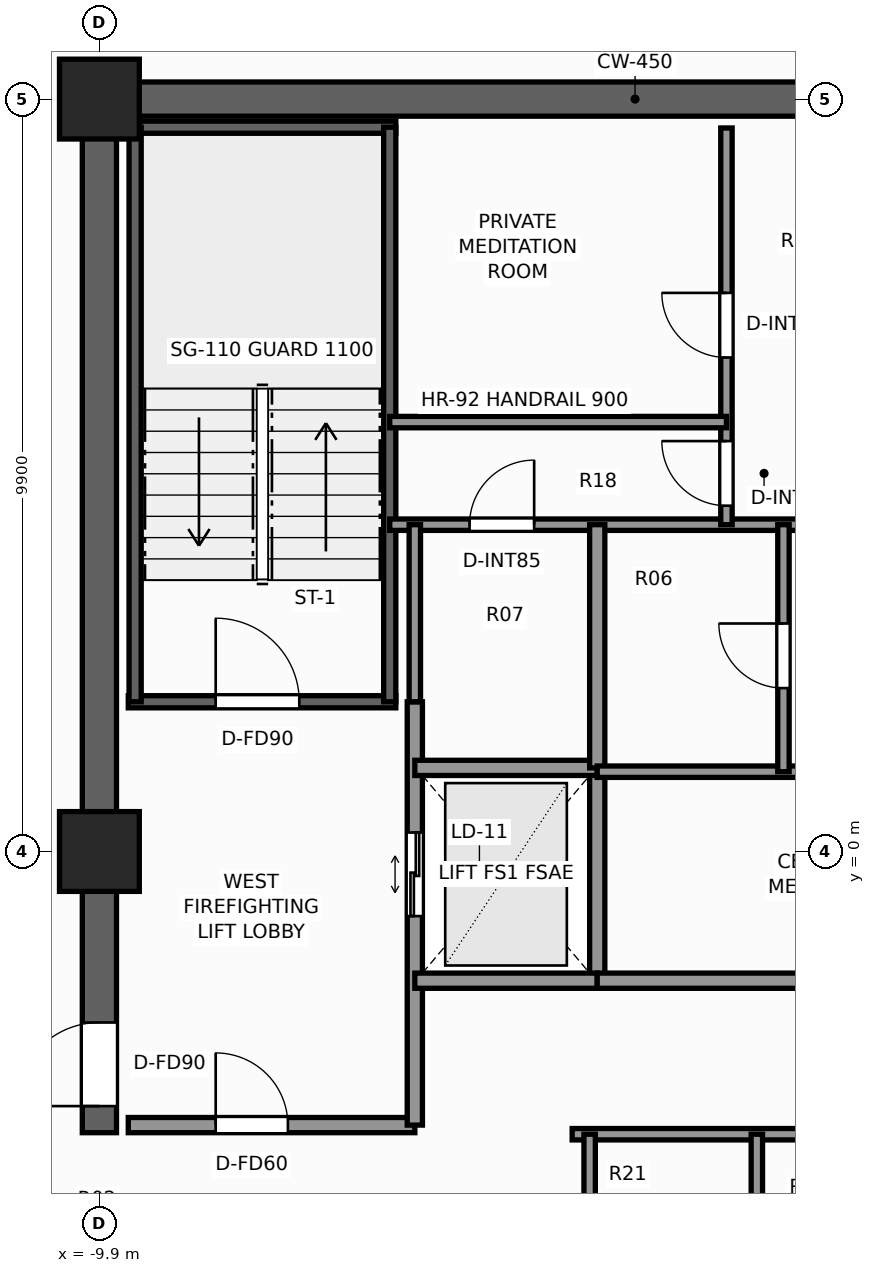
"""IFC4 building model, lengths in metres.
Left out: names, types, materials, properties, quantities, classifications, styles, units other than length and angle.
Written with IfcOpenShell. Run it as: python <this file> out.ifc"""

import sys

from ifc_helpers import new_model, si_unit, direction, frame, frame_2d, origin, origin_2d, place, context, subcontext, project, spatial, rectangle, extrude, element, fill, save


model = new_model("IFC4")
c1 = context("Model", 3, precision=1e-05, world=origin(), true_north=direction((0.0, 1.0)))
c2 = subcontext(c1, "Body", "Model", "MODEL_VIEW")
j1 = project(units=[si_unit("LENGTHUNIT", "METRE"), si_unit("PLANEANGLEUNIT", "RADIAN")], contexts=[c1])
p1 = place(None, origin())
s1 = spatial("IfcSite", under=j1, at=p1, CompositionType="ELEMENT")
p2 = place(p1, origin())
s2 = spatial("IfcBuilding", under=s1, at=p2, CompositionType="ELEMENT")
p3 = place(p2, frame((0.0, 0.0, 240.9)))
s3 = spatial("IfcBuildingStorey", under=s2, at=p3, CompositionType="ELEMENT", Elevation=240.9)
p4 = place(p3, frame((-10.125, 9.9, 0.0), z_axis=(0.0, 0.0, 1.0), x_axis=(1.0, 0.0, 0.0)))
e1 = element("IfcWall", 1, at=p4, inside=s3, PredefinedType="SHEAR", context=c2, shape_type="SweptSolid", body=[
    extrude(rectangle(XDim=14.545, YDim=0.45, at=frame_2d((7.272, 0.0))), origin(), (0.0, 0.0, 1.0), 3.5),
])
p5 = place(p3, frame((-9.9, -3.7, 0.0), z_axis=(0.0, 0.0, 1.0), x_axis=(0.0, 1.0, 0.0)))
e2 = element("IfcWall", 2, at=p5, inside=s3, PredefinedType="SHEAR", context=c2, shape_type="SweptSolid", body=[
    extrude(rectangle(XDim=13.375, YDim=0.45, at=frame_2d((6.688, 0.0))), origin(), (0.0, 0.0, 1.0), 3.5),
])
p6 = place(p5, frame((0.35, 0.0, 0.0)))
e3 = element("IfcOpeningElement", 3, at=p6, cuts=e2, PredefinedType="OPENING", context=c2, shape_type="SweptSolid", body=[
    extrude(rectangle(XDim=1.1, YDim=2.2, at=frame_2d((0.55, 1.1))), frame((0.0, 0.235, 0.0), z_axis=(0.0, -1.0, 0.0), x_axis=(1.0, 0.0, 0.0)), (0.0, 0.0, 1.0), 0.47),
])
for number, where, z_axis, x_axis in (
    (4, (-9.9, 9.9, 0.0), (0.0, 0.0, 1.0), (1.0, 0.0, 0.0)),
    (5, (-9.9, 0.0, 0.0), (0.0, 0.0, 1.0), (1.0, 0.0, 0.0)),
):
    element("IfcColumn", number, at=place(p3, frame(where, z_axis=z_axis, x_axis=x_axis)), inside=s3, PredefinedType="COLUMN", context=c2, shape_type="SweptSolid", body=[
        extrude(rectangle(XDim=1.05, YDim=1.05, at=origin_2d()), origin(), (0.0, 0.0, 1.0), 3.5),
    ])
p7 = place(p3, frame((-9.52, 1.97, 0.0), z_axis=(0.0, 0.0, 1.0), x_axis=(1.0, 0.0, 0.0)))
e6 = element("IfcWall", 6, at=p7, inside=s3, PredefinedType="SHEAR", context=c2, shape_type="SweptSolid", body=[
    extrude(rectangle(XDim=3.52, YDim=0.16, at=frame_2d((1.76, 0.0))), origin(), (0.0, 0.0, 1.0), 3.5),
])
p8 = place(p7, frame((1.15, 0.0, 0.0)))
e7 = element("IfcOpeningElement", 7, at=p8, cuts=e6, PredefinedType="OPENING", context=c2, shape_type="SweptSolid", body=[
    extrude(rectangle(XDim=1.1, YDim=2.2, at=frame_2d((0.55, 1.1))), frame((0.0, 0.09, 0.0), z_axis=(0.0, -1.0, 0.0), x_axis=(1.0, 0.0, 0.0)), (0.0, 0.0, 1.0), 0.18),
])
p9 = place(p3, frame((-9.52, 9.53, 0.0), z_axis=(0.0, 0.0, 1.0), x_axis=(1.0, 0.0, 0.0)))
e8 = element("IfcWall", 8, at=p9, inside=s3, PredefinedType="SHEAR", context=c2, shape_type="SweptSolid", body=[
    extrude(rectangle(XDim=3.52, YDim=0.16, at=frame_2d((1.76, 0.0))), origin(), (0.0, 0.0, 1.0), 3.5),
])
for number, where, z_axis, x_axis in (
    (9, (-9.43, 1.97, 0.0), (0.0, 0.0, 1.0), (0.0, 1.0, 0.0)),
    (10, (-6.08, 1.97, 0.0), (0.0, 0.0, 1.0), (0.0, 1.0, 0.0)),
):
    element("IfcWall", number, at=place(p3, frame(where, z_axis=z_axis, x_axis=x_axis)), inside=s3, PredefinedType="SHEAR", context=c2, shape_type="SweptSolid", body=[
        extrude(rectangle(XDim=7.56, YDim=0.16, at=frame_2d((3.78, 0.0))), origin(), (0.0, 0.0, 1.0), 3.5),
    ])
p10 = place(p3, frame((-9.52, -3.6, 0.0), z_axis=(0.0, 0.0, 1.0), x_axis=(1.0, 0.0, 0.0)))
e11 = element("IfcWall", 11, at=p10, inside=s3, PredefinedType="SOLIDWALL", context=c2, shape_type="SweptSolid", body=[
    extrude(rectangle(XDim=3.77, YDim=0.2, at=frame_2d((1.885, 0.0))), origin(), (0.0, 0.0, 1.0), 3.25),
])
p11 = place(p10, frame((1.15, 0.0, 0.0)))
e12 = element("IfcOpeningElement", 12, at=p11, cuts=e11, PredefinedType="OPENING", context=c2, shape_type="SweptSolid", body=[
    extrude(rectangle(XDim=0.95, YDim=2.06, at=frame_2d((0.475, 1.03))), frame((0.0, 0.11, 0.0), z_axis=(0.0, -1.0, 0.0), x_axis=(1.0, 0.0, 0.0)), (0.0, 0.0, 1.0), 0.22),
])
p12 = place(p3, frame((-5.75, -3.6, 0.0), z_axis=(0.0, 0.0, 1.0), x_axis=(0.0, 1.0, 0.0)))
e13 = element("IfcWall", 13, at=p12, inside=s3, PredefinedType="SOLIDWALL", context=c2, shape_type="SweptSolid", body=[
    extrude(rectangle(XDim=5.57, YDim=0.2, at=frame_2d((2.785, 0.0))), origin(), (0.0, 0.0, 1.0), 3.25),
])
p13 = place(p12, frame((2.75, 0.0, 0.0)))
e14 = element("IfcOpeningElement", 14, at=p13, cuts=e13, PredefinedType="OPENING", context=c2, shape_type="SweptSolid", body=[
    extrude(rectangle(XDim=1.1, YDim=2.2, at=frame_2d((0.55, 1.1))), frame((0.0, 0.11, 0.0), z_axis=(0.0, -1.0, 0.0), x_axis=(1.0, 0.0, 0.0)), (0.0, 0.0, 1.0), 0.22),
])
p14 = place(p3, frame((-3.35, -1.7, 0.0), z_axis=(0.0, 0.0, 1.0), x_axis=(0.0, 1.0, 0.0)))
e15 = element("IfcWall", 15, at=p14, inside=s3, PredefinedType="SOLIDWALL", context=c2, shape_type="SweptSolid", body=[
    extrude(rectangle(XDim=2.8, YDim=0.2, at=frame_2d((1.4, 0.0))), origin(), (0.0, 0.0, 1.0), 3.25),
])
for number, where, z_axis, x_axis in (
    (16, (-5.75, -1.7, 0.0), (0.0, 0.0, 1.0), (1.0, 0.0, 0.0)),
    (17, (-5.75, 1.1, 0.0), (0.0, 0.0, 1.0), (1.0, 0.0, 0.0)),
):
    element("IfcWall", number, at=place(p3, frame(where, z_axis=z_axis, x_axis=x_axis)), inside=s3, PredefinedType="SOLIDWALL", context=c2, shape_type="SweptSolid", body=[
        extrude(rectangle(XDim=2.4, YDim=0.2, at=frame_2d((1.2, 0.0))), origin(), (0.0, 0.0, 1.0), 3.25),
    ])
p15 = place(p3, frame((-6.08, 4.3, 0.0), z_axis=(0.0, 0.0, 1.0), x_axis=(1.0, 0.0, 0.0)))
e18 = element("IfcWall", 18, at=p15, inside=s3, PredefinedType="PARTITIONING", context=c2, shape_type="SweptSolid", body=[
    extrude(rectangle(XDim=6.3, YDim=0.15, at=frame_2d((3.15, 0.0))), origin(), (0.0, 0.0, 1.0), 3.25),
])
p16 = place(p15, frame((1.05, 0.0, 0.0)))
e19 = element("IfcOpeningElement", 19, at=p16, cuts=e18, PredefinedType="OPENING", context=c2, shape_type="SweptSolid", body=[
    extrude(rectangle(XDim=0.85, YDim=2.03, at=frame_2d((0.425, 1.015))), frame((0.0, 0.085, 0.0), z_axis=(0.0, -1.0, 0.0), x_axis=(1.0, 0.0, 0.0)), (0.0, 0.0, 1.0), 0.17),
])
p17 = place(p3, frame((-1.65, 4.3, 0.0), z_axis=(0.0, 0.0, 1.0), x_axis=(0.0, 1.0, 0.0)))
e20 = element("IfcWall", 20, at=p17, inside=s3, PredefinedType="PARTITIONING", context=c2, shape_type="SweptSolid", body=[
    extrude(rectangle(XDim=5.22, YDim=0.15, at=frame_2d((2.61, 0.0))), origin(), (0.0, 0.0, 1.0), 3.25),
])
p18 = place(p17, frame((2.2, 0.0, 0.0)))
e21 = element("IfcOpeningElement", 21, at=p18, cuts=e20, PredefinedType="OPENING", context=c2, shape_type="SweptSolid", body=[
    extrude(rectangle(XDim=0.85, YDim=2.03, at=frame_2d((0.425, 1.015))), frame((0.0, 0.085, 0.0), z_axis=(0.0, -1.0, 0.0), x_axis=(1.0, 0.0, 0.0)), (0.0, 0.0, 1.0), 0.17),
])
p19 = place(p17, frame((0.25, 0.0, 0.0)))
e22 = element("IfcOpeningElement", 22, at=p19, cuts=e20, PredefinedType="OPENING", context=c2, shape_type="SweptSolid", body=[
    extrude(rectangle(XDim=0.85, YDim=2.03, at=frame_2d((0.425, 1.015))), frame((0.0, 0.085, 0.0), z_axis=(0.0, -1.0, 0.0), x_axis=(1.0, 0.0, 0.0)), (0.0, 0.0, 1.0), 0.17),
])
p20 = place(p3, frame((-6.08, 5.65, 0.0), z_axis=(0.0, 0.0, 1.0), x_axis=(1.0, 0.0, 0.0)))
e23 = element("IfcWall", 23, at=p20, inside=s3, PredefinedType="PARTITIONING", context=c2, shape_type="SweptSolid", body=[
    extrude(rectangle(XDim=4.43, YDim=0.15, at=frame_2d((2.215, 0.0))), origin(), (0.0, 0.0, 1.0), 3.25),
])
p21 = place(p3, frame((-3.35, -1.7, 0.0), z_axis=(0.0, 0.0, 1.0), x_axis=(1.0, 0.0, 0.0)))
e24 = element("IfcWall", 24, at=p21, inside=s3, PredefinedType="SOLIDWALL", context=c2, shape_type="SweptSolid", body=[
    extrude(rectangle(XDim=6.7, YDim=0.2, at=frame_2d((3.35, 0.0))), origin(), (0.0, 0.0, 1.0), 3.25),
])
p22 = place(p3, frame((-3.35, 1.1, 0.0), z_axis=(0.0, 0.0, 1.0), x_axis=(0.0, 1.0, 0.0)))
e25 = element("IfcWall", 25, at=p22, inside=s3, PredefinedType="SOLIDWALL", context=c2, shape_type="SweptSolid", body=[
    extrude(rectangle(XDim=3.2, YDim=0.2, at=frame_2d((1.6, 0.0))), origin(), (0.0, 0.0, 1.0), 3.25),
])
p23 = place(p3, frame((-3.35, 1.05, 0.0), z_axis=(0.0, 0.0, 1.0), x_axis=(1.0, 0.0, 0.0)))
e26 = element("IfcWall", 26, at=p23, inside=s3, PredefinedType="PARTITIONING", context=c2, shape_type="SweptSolid", body=[
    extrude(rectangle(XDim=6.7, YDim=0.15, at=frame_2d((3.35, 0.0))), origin(), (0.0, 0.0, 1.0), 3.25),
])
p24 = place(p23, frame((4.2, 0.0, 0.0)))
e27 = element("IfcOpeningElement", 27, at=p24, cuts=e26, PredefinedType="OPENING", context=c2, shape_type="SweptSolid", body=[
    extrude(rectangle(XDim=0.85, YDim=2.03, at=frame_2d((0.425, 1.015))), frame((0.0, 0.085, 0.0), z_axis=(0.0, -1.0, 0.0), x_axis=(1.0, 0.0, 0.0)), (0.0, 0.0, 1.0), 0.17),
])
p25 = place(p3, frame((-0.9, 1.05, 0.0), z_axis=(0.0, 0.0, 1.0), x_axis=(0.0, 1.0, 0.0)))
e28 = element("IfcWall", 28, at=p25, inside=s3, PredefinedType="PARTITIONING", context=c2, shape_type="SweptSolid", body=[
    extrude(rectangle(XDim=3.25, YDim=0.15, at=frame_2d((1.625, 0.0))), origin(), (0.0, 0.0, 1.0), 3.25),
])
p26 = place(p25, frame((1.1, 0.0, 0.0)))
e29 = element("IfcOpeningElement", 29, at=p26, cuts=e28, PredefinedType="OPENING", context=c2, shape_type="SweptSolid", body=[
    extrude(rectangle(XDim=0.85, YDim=2.03, at=frame_2d((0.425, 1.015))), frame((0.0, 0.085, 0.0), z_axis=(0.0, -1.0, 0.0), x_axis=(1.0, 0.0, 0.0)), (0.0, 0.0, 1.0), 0.17),
])
p27 = place(p3, frame((-3.68, -3.72, 0.0), z_axis=(0.0, 0.0, 1.0), x_axis=(1.0, 0.0, 0.0)))
e30 = element("IfcWall", 30, at=p27, inside=s3, PredefinedType="PARTITIONING", context=c2, shape_type="SweptSolid", body=[
    extrude(rectangle(XDim=7.36, YDim=0.15, at=frame_2d((3.68, 0.0))), origin(), (0.0, 0.0, 1.0), 3.25),
])
p28 = place(p3, frame((-3.45, -6.08, 0.0), z_axis=(0.0, 0.0, 1.0), x_axis=(0.0, 1.0, 0.0)))
e31 = element("IfcWall", 31, at=p28, inside=s3, PredefinedType="PARTITIONING", context=c2, shape_type="SweptSolid", body=[
    extrude(rectangle(XDim=2.36, YDim=0.15, at=frame_2d((1.18, 0.0))), origin(), (0.0, 0.0, 1.0), 3.25),
])
p29 = place(p3, frame((-1.25, -6.08, 0.0), z_axis=(0.0, 0.0, 1.0), x_axis=(0.0, 1.0, 0.0)))
e32 = element("IfcWall", 32, at=p29, inside=s3, PredefinedType="PARTITIONING", context=c2, shape_type="SweptSolid", body=[
    extrude(rectangle(XDim=2.36, YDim=0.15, at=frame_2d((1.18, 0.0))), origin(), (0.0, 0.0, 1.0), 3.25),
])
p30 = place(p29, frame((0.65, 0.0, 0.0)))
e33 = element("IfcOpeningElement", 33, at=p30, cuts=e32, PredefinedType="OPENING", context=c2, shape_type="SweptSolid", body=[
    extrude(rectangle(XDim=0.9, YDim=2.06, at=frame_2d((0.45, 1.03))), frame((0.0, 0.085, 0.0), z_axis=(0.0, -1.0, 0.0), x_axis=(1.0, 0.0, 0.0)), (0.0, 0.0, 1.0), 0.17),
])
p31 = place(p3, frame((-5.75, 1.97, 0.0), z_axis=(0.0, 0.0, 1.0), x_axis=(0.0, 1.0, 0.0)))
e34 = element("IfcWall", 34, at=p31, inside=s3, PredefinedType="PARTITIONING", context=c2, shape_type="SweptSolid", body=[
    extrude(rectangle(XDim=2.33, YDim=0.15, at=frame_2d((1.165, 0.0))), origin(), (0.0, 0.0, 1.0), 3.25),
])
p32 = place(p8, origin())
e35 = element("IfcDoor", 35, at=p32, inside=s3, OperationType="SINGLE_SWING_LEFT", PredefinedType="DOOR", context=c2, shape_type="SweptSolid", body=[
    extrude(rectangle(XDim=1.1, YDim=2.2, at=frame_2d((0.55, 1.1))), frame((0.0, 0.025, 0.0), z_axis=(0.0, -1.0, 0.0), x_axis=(1.0, 0.0, 0.0)), (0.0, 0.0, 1.0), 0.05),
])
fill(e7, e35)
p33 = place(p6, origin())
e36 = element("IfcDoor", 36, at=p33, inside=s3, OperationType="SINGLE_SWING_LEFT", PredefinedType="DOOR", context=c2, shape_type="SweptSolid", body=[
    extrude(rectangle(XDim=1.1, YDim=2.2, at=frame_2d((0.55, 1.1))), frame((0.0, 0.025, 0.0), z_axis=(0.0, -1.0, 0.0), x_axis=(1.0, 0.0, 0.0)), (0.0, 0.0, 1.0), 0.05),
])
fill(e3, e36)
p34 = place(p13, origin())
e37 = element("IfcDoor", 37, at=p34, inside=s3, OperationType="DOUBLE_DOOR_SLIDING", PredefinedType="DOOR", context=c2, shape_type="SweptSolid", body=[
    extrude(rectangle(XDim=1.1, YDim=2.2, at=frame_2d((0.55, 1.1))), frame((0.0, 0.025, 0.0), z_axis=(0.0, -1.0, 0.0), x_axis=(1.0, 0.0, 0.0)), (0.0, 0.0, 1.0), 0.05),
])
fill(e14, e37)
p35 = place(p18, origin())
e38 = element("IfcDoor", 38, at=p35, inside=s3, OperationType="SINGLE_SWING_RIGHT", PredefinedType="DOOR", context=c2, shape_type="SweptSolid", body=[
    extrude(rectangle(XDim=0.85, YDim=2.03, at=frame_2d((0.425, 1.015))), frame((0.0, 0.025, 0.0), z_axis=(0.0, -1.0, 0.0), x_axis=(1.0, 0.0, 0.0)), (0.0, 0.0, 1.0), 0.05),
])
fill(e21, e38)
p36 = place(p19, origin())
e39 = element("IfcDoor", 39, at=p36, inside=s3, OperationType="SINGLE_SWING_RIGHT", PredefinedType="DOOR", context=c2, shape_type="SweptSolid", body=[
    extrude(rectangle(XDim=0.85, YDim=2.03, at=frame_2d((0.425, 1.015))), frame((0.0, 0.025, 0.0), z_axis=(0.0, -1.0, 0.0), x_axis=(1.0, 0.0, 0.0)), (0.0, 0.0, 1.0), 0.05),
])
fill(e22, e39)
p37 = place(p11, origin())
e40 = element("IfcDoor", 40, at=p37, inside=s3, OperationType="SINGLE_SWING_LEFT", PredefinedType="DOOR", context=c2, shape_type="SweptSolid", body=[
    extrude(rectangle(XDim=0.95, YDim=2.06, at=frame_2d((0.475, 1.03))), frame((0.0, 0.025, 0.0), z_axis=(0.0, -1.0, 0.0), x_axis=(1.0, 0.0, 0.0)), (0.0, 0.0, 1.0), 0.05),
])
fill(e12, e40)
p38 = place(p26, origin())
e41 = element("IfcDoor", 41, at=p38, inside=s3, OperationType="SINGLE_SWING_RIGHT", PredefinedType="DOOR", context=c2, shape_type="SweptSolid", body=[
    extrude(rectangle(XDim=0.85, YDim=2.03, at=frame_2d((0.425, 1.015))), frame((0.0, 0.025, 0.0), z_axis=(0.0, -1.0, 0.0), x_axis=(1.0, 0.0, 0.0)), (0.0, 0.0, 1.0), 0.05),
])
fill(e29, e41)
p39 = place(p16, origin())
e42 = element("IfcDoor", 42, at=p39, inside=s3, OperationType="SINGLE_SWING_RIGHT", PredefinedType="DOOR", context=c2, shape_type="SweptSolid", body=[
    extrude(rectangle(XDim=0.85, YDim=2.03, at=frame_2d((0.425, 1.015))), frame((0.0, 0.025, 0.0), z_axis=(0.0, -1.0, 0.0), x_axis=(1.0, 0.0, 0.0)), (0.0, 0.0, 1.0), 0.05),
])
fill(e19, e42)
save(model, sys.argv[1])
